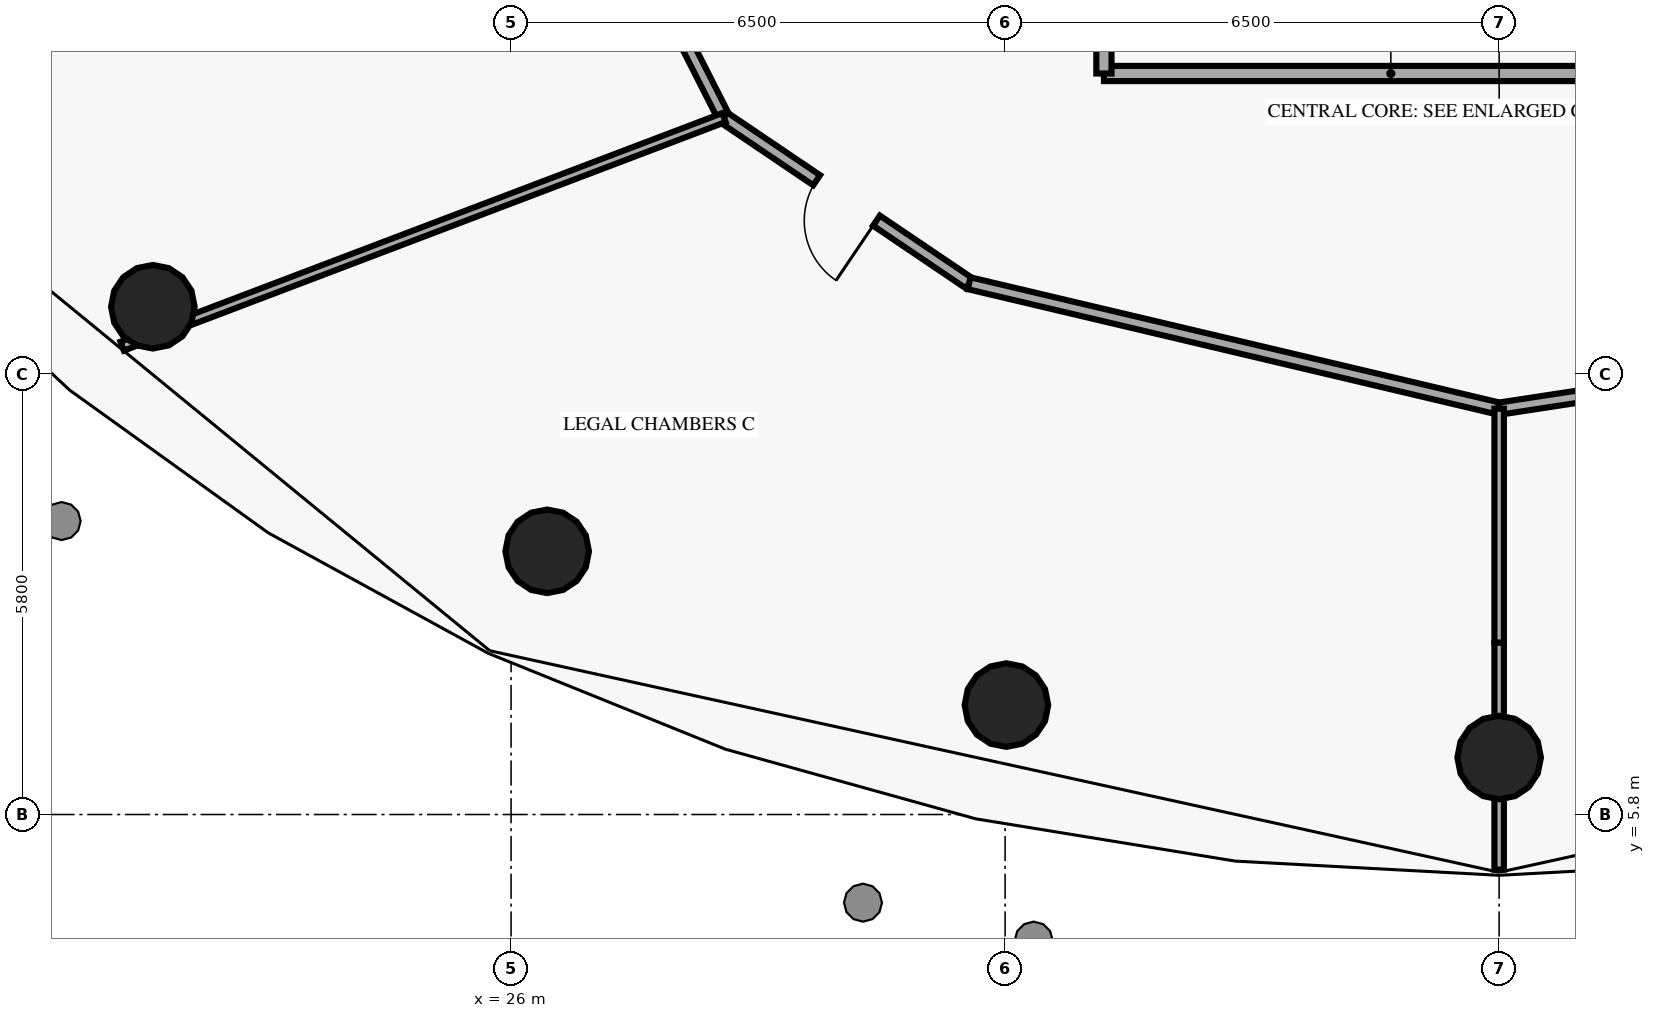
"""IFC4 building model, lengths in metres.
Left out: names, types, materials, properties, quantities, classifications, styles, units other than length and angle.
Written with IfcOpenShell. Run it as: python <this file> out.ifc"""

import sys

from ifc_helpers import new_model, si_unit, direction, frame, frame_2d, origin, origin_2d, place, context, subcontext, project, spatial, rectangle, circle, extrude, element, fill, save


model = new_model("IFC4")
c1 = context("Model", 3, precision=1e-05, world=origin(), true_north=direction((0.0, 1.0)))
c2 = subcontext(c1, "Body", "Model", "MODEL_VIEW")
j1 = project(units=[si_unit("LENGTHUNIT", "METRE"), si_unit("PLANEANGLEUNIT", "RADIAN")], contexts=[c1])
p1 = place(None, origin())
s1 = spatial("IfcSite", under=j1, at=p1, CompositionType="ELEMENT")
p2 = place(p1, origin())
s2 = spatial("IfcBuilding", under=s1, at=p2, CompositionType="ELEMENT")
p3 = place(p2, frame((0.0, 0.0, 53.4)))
s3 = spatial("IfcBuildingStorey", under=s2, at=p3, CompositionType="ELEMENT", Elevation=53.4)
for number, where, z_axis, x_axis in (
    (1, (21.287, 12.481, 0.0), (0.0, 0.0, 1.0), (1.0, 0.0, 0.0)),
    (2, (26.475, 9.263, 0.0), (0.0, 0.0, 1.0), (1.0, 0.0, 0.0)),
    (3, (32.517, 7.24, 0.0), (0.0, 0.0, 1.0), (1.0, 0.0, 0.0)),
    (4, (39.0, 6.55, 0.0), (0.0, 0.0, 1.0), (1.0, 0.0, 0.0)),
):
    element("IfcColumn", number, at=place(p3, frame(where, z_axis=z_axis, x_axis=x_axis)), inside=s3, PredefinedType="COLUMN", context=c2, shape_type="SweptSolid", body=[
        extrude(circle(Radius=0.55, at=origin_2d()), origin(), (0.0, 0.0, 1.0), 3.8),
    ])
p4 = place(p3, frame((33.8, 15.55, 0.0), z_axis=(0.0, 0.0, 1.0), x_axis=(1.0, 0.0, 0.0)))
e5 = element("IfcWall", 5, at=p4, inside=s3, PredefinedType="SOLIDWALL", context=c2, shape_type="SweptSolid", body=[
    extrude(rectangle(XDim=7.55, YDim=0.2, at=frame_2d((3.775, 0.0))), origin(), (0.0, 0.0, 1.0), 3.8),
])
p5 = place(p3, frame((33.8, 15.55, 0.0), z_axis=(0.0, 0.0, 1.0), x_axis=(0.0, 1.0, 0.0)))
e6 = element("IfcWall", 6, at=p5, inside=s3, PredefinedType="SOLIDWALL", context=c2, shape_type="SweptSolid", body=[
    extrude(rectangle(XDim=2.8, YDim=0.2, at=frame_2d((1.4, 0.0))), origin(), (0.0, 0.0, 1.0), 3.8),
])
p6 = place(p3, frame((25.005, 22.45, 0.0), z_axis=(0.0, 0.0, 1.0), x_axis=(0.452560985886, -0.8917334546, 0.0)))
e7 = element("IfcWall", 7, at=p6, inside=s3, PredefinedType="PARTITIONING", context=c2, shape_type="SweptSolid", body=[
    extrude(rectangle(XDim=8.388, YDim=0.16, at=frame_2d((4.194, 0.0))), origin(), (0.0, 0.0, 1.0), 3.8),
])
p7 = place(p3, frame((32.027, 12.79, 0.0), z_axis=(0.0, 0.0, 1.0), x_axis=(-0.828570886609, 0.559884171828, 0.0)))
e8 = element("IfcWall", 8, at=p7, inside=s3, PredefinedType="PARTITIONING", context=c2, shape_type="SweptSolid", body=[
    extrude(rectangle(XDim=3.894, YDim=0.16, at=frame_2d((1.947, 0.0))), origin(), (0.0, 0.0, 1.0), 3.8),
])
p8 = place(p7, frame((1.472, 0.0, 0.0)))
e9 = element("IfcOpeningElement", 9, at=p8, cuts=e8, PredefinedType="OPENING", context=c2, shape_type="SweptSolid", body=[
    extrude(rectangle(XDim=0.95, YDim=2.15, at=frame_2d((0.475, 1.075))), frame((0.0, 0.09, 0.0), z_axis=(0.0, -1.0, 0.0), x_axis=(1.0, 0.0, 0.0)), (0.0, 0.0, 1.0), 0.18),
])
p9 = place(p3, frame((32.027, 12.79, 0.0), z_axis=(0.0, 0.0, 1.0), x_axis=(0.973121894952, -0.230290637162, 0.0)))
e10 = element("IfcWall", 10, at=p9, inside=s3, PredefinedType="PARTITIONING", context=c2, shape_type="SweptSolid", body=[
    extrude(rectangle(XDim=7.166, YDim=0.16, at=frame_2d((3.583, 0.0))), origin(), (0.0, 0.0, 1.0), 3.8),
])
p10 = place(p3, frame((42.494, 11.674, 0.0), z_axis=(0.0, 0.0, 1.0), x_axis=(-0.988513405878, -0.151133207467, 0.0)))
e11 = element("IfcWall", 11, at=p10, inside=s3, PredefinedType="PARTITIONING", context=c2, shape_type="SweptSolid", body=[
    extrude(rectangle(XDim=3.534, YDim=0.16, at=frame_2d((1.767, 0.0))), origin(), (0.0, 0.0, 1.0), 3.8),
])
p11 = place(p10, frame((1.292, 0.0, 0.0)))
e12 = element("IfcOpeningElement", 12, at=p11, cuts=e11, PredefinedType="OPENING", context=c2, shape_type="SweptSolid", body=[
    extrude(rectangle(XDim=0.95, YDim=2.15, at=frame_2d((0.475, 1.075))), frame((0.0, 0.09, 0.0), z_axis=(0.0, -1.0, 0.0), x_axis=(1.0, 0.0, 0.0)), (0.0, 0.0, 1.0), 0.18),
])
p12 = place(p3, frame((28.801, 14.97, 0.0), z_axis=(0.0, 0.0, 1.0), x_axis=(-0.934813821548, -0.355138168947, 0.0)))
e13 = element("IfcWall", 13, at=p12, inside=s3, PredefinedType="PARTITIONING", context=c2, shape_type="SweptSolid", body=[
    extrude(rectangle(XDim=8.47, YDim=0.125, at=frame_2d((4.235, 0.0))), origin(), (0.0, 0.0, 1.0), 3.8),
])
p13 = place(p3, frame((39.0, 11.14, 0.0), z_axis=(0.0, 0.0, 1.0), x_axis=(0.0, -1.0, 0.0)))
e14 = element("IfcWall", 14, at=p13, inside=s3, PredefinedType="PARTITIONING", context=c2, shape_type="SweptSolid", body=[
    extrude(rectangle(XDim=3.08, YDim=0.125, at=frame_2d((1.54, 0.0))), origin(), (0.0, 0.0, 1.0), 3.8),
])
p14 = place(p3, frame((39.0, 8.06, 0.0), z_axis=(0.0, 0.0, 1.0), x_axis=(0.0, -1.0, 0.0)))
e15 = element("IfcWall", 15, at=p14, inside=s3, PredefinedType="PARTITIONING", context=c2, shape_type="SweptSolid", body=[
    extrude(rectangle(XDim=1.519, YDim=0.125, at=frame_2d((0.76, 0.0))), origin(), (0.0, 0.0, 1.0), 2.94),
])
p15 = place(p3, frame((39.0, 6.541, 0.0), z_axis=(0.0, 0.0, 1.0), x_axis=(0.0, -1.0, 0.0)))
e16 = element("IfcWall", 16, at=p15, inside=s3, PredefinedType="PARTITIONING", context=c2, shape_type="SweptSolid", body=[
    extrude(rectangle(XDim=1.466, YDim=0.125, at=frame_2d((0.733, 0.0))), origin(), (0.0, 0.0, 1.0), 3.8),
])
p16 = place(p8, origin())
e17 = element("IfcDoor", 17, at=p16, inside=s3, OperationType="SINGLE_SWING_LEFT", PredefinedType="DOOR", context=c2, shape_type="SweptSolid", body=[
    extrude(rectangle(XDim=0.95, YDim=2.15, at=frame_2d((0.475, 1.075))), frame((0.0, 0.025, 0.0), z_axis=(0.0, -1.0, 0.0), x_axis=(1.0, 0.0, 0.0)), (0.0, 0.0, 1.0), 0.05),
])
fill(e9, e17)
save(model, sys.argv[1])
